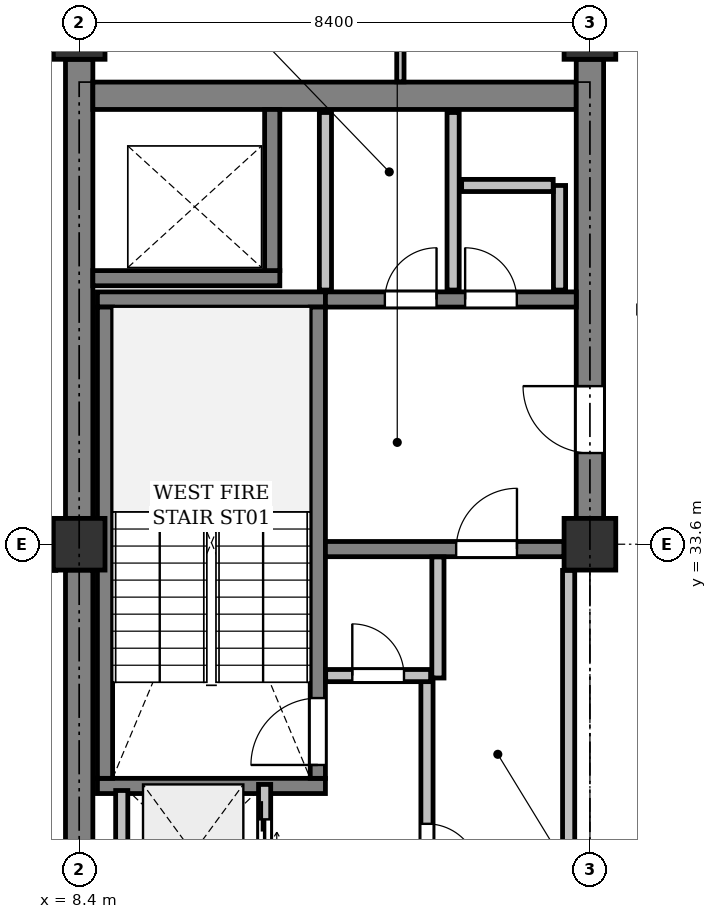
"""IFC4 building model, lengths in metres.
Left out: names, types, materials, properties, quantities, classifications, styles, units other than length and angle.
Written with IfcOpenShell. Run it as: python <this file> out.ifc"""

import sys

from ifc_helpers import new_model, si_unit, direction, frame, frame_2d, origin, origin_2d, place, context, subcontext, project, spatial, rectangle, extrude, element, fill, save


model = new_model("IFC4")
c1 = context("Model", 3, precision=1e-05, world=origin(), true_north=direction((0.0, 1.0)))
c2 = subcontext(c1, "Body", "Model", "MODEL_VIEW")
j1 = project(units=[si_unit("LENGTHUNIT", "METRE"), si_unit("PLANEANGLEUNIT", "RADIAN")], contexts=[c1])
p1 = place(None, origin())
s1 = spatial("IfcSite", under=j1, at=p1, CompositionType="ELEMENT")
p2 = place(p1, origin())
s2 = spatial("IfcBuilding", under=s1, at=p2, CompositionType="ELEMENT")
p3 = place(p2, frame((0.0, 0.0, 314.2)))
s3 = spatial("IfcBuildingStorey", under=s2, at=p3, CompositionType="ELEMENT", Elevation=314.2)
for number, where, z_axis, x_axis in (
    (1, (8.4, 33.6, 0.0), (0.0, 0.0, 1.0), (1.0, 0.0, 0.0)),
    (2, (8.4, 42.0, 0.0), (0.0, 0.0, 1.0), (1.0, 0.0, 0.0)),
    (3, (16.8, 33.6, 0.0), (0.0, 0.0, 1.0), (1.0, 0.0, 0.0)),
    (4, (16.8, 42.0, 0.0), (0.0, 0.0, 1.0), (1.0, 0.0, 0.0)),
):
    element("IfcColumn", number, at=place(p3, frame(where, z_axis=z_axis, x_axis=x_axis)), inside=s3, PredefinedType="COLUMN", context=c2, shape_type="SweptSolid", body=[
        extrude(rectangle(XDim=0.85, YDim=0.85, at=origin_2d()), origin(), (0.0, 0.0, 1.0), 4.0),
    ])
for number, where, z_axis, x_axis in (
    (5, (8.4, 25.625, 0.0), (0.0, 0.0, 1.0), (0.0, 1.0, 0.0)),
    (6, (8.4, 34.025, 0.0), (0.0, 0.0, 1.0), (0.0, 1.0, 0.0)),
):
    element("IfcWall", number, at=place(p3, frame(where, z_axis=z_axis, x_axis=x_axis)), inside=s3, PredefinedType="SHEAR", context=c2, shape_type="SweptSolid", body=[
        extrude(rectangle(XDim=7.55, YDim=0.45, at=frame_2d((3.775, 0.0))), origin(), (0.0, 0.0, 1.0), 3.725),
    ])
p4 = place(p3, frame((8.625, 40.975, 0.0), z_axis=(0.0, 0.0, 1.0), x_axis=(1.0, 0.0, 0.0)))
e7 = element("IfcWall", 7, at=p4, inside=s3, PredefinedType="SHEAR", context=c2, shape_type="SweptSolid", body=[
    extrude(rectangle(XDim=7.95, YDim=0.45, at=frame_2d((3.975, 0.0))), origin(), (0.0, 0.0, 1.0), 3.725),
])
p5 = place(p3, frame((16.8, 34.025, 0.0), z_axis=(0.0, 0.0, 1.0), x_axis=(0.0, 1.0, 0.0)))
e8 = element("IfcWall", 8, at=p5, inside=s3, PredefinedType="SHEAR", context=c2, shape_type="SweptSolid", body=[
    extrude(rectangle(XDim=7.55, YDim=0.45, at=frame_2d((3.775, 0.0))), origin(), (0.0, 0.0, 1.0), 3.725),
])
p6 = place(p5, frame((1.075, 0.0, 0.0)))
e9 = element("IfcOpeningElement", 9, at=p6, cuts=e8, PredefinedType="OPENING", context=c2, shape_type="SweptSolid", body=[
    extrude(rectangle(XDim=1.1, YDim=2.15, at=frame_2d((0.55, 1.075))), frame((0.0, 0.235, 0.0), z_axis=(0.0, -1.0, 0.0), x_axis=(1.0, 0.0, 0.0)), (0.0, 0.0, 1.0), 0.47),
])
for number, where, z_axis, x_axis in (
    (10, (12.45, 29.625, 0.0), (0.0, 0.0, 1.0), (-1.0, 0.0, 0.0)),
    (11, (12.45, 37.625, 0.0), (0.0, 0.0, 1.0), (-1.0, 0.0, 0.0)),
):
    element("IfcWall", number, at=place(p3, frame(where, z_axis=z_axis, x_axis=x_axis)), inside=s3, PredefinedType="SHEAR", context=c2, shape_type="SweptSolid", body=[
        extrude(rectangle(XDim=3.75, YDim=0.25, at=frame_2d((1.875, 0.0))), origin(), (0.0, 0.0, 1.0), 3.725),
    ])
p7 = place(p3, frame((12.325, 29.75, 0.0), z_axis=(0.0, 0.0, 1.0), x_axis=(0.0, 1.0, 0.0)))
e12 = element("IfcWall", 12, at=p7, inside=s3, PredefinedType="SHEAR", context=c2, shape_type="SweptSolid", body=[
    extrude(rectangle(XDim=7.75, YDim=0.25, at=frame_2d((3.875, 0.0))), origin(), (0.0, 0.0, 1.0), 3.725),
])
p8 = place(p7, frame((0.22, 0.0, 0.0)))
e13 = element("IfcOpeningElement", 13, at=p8, cuts=e12, PredefinedType="OPENING", context=c2, shape_type="SweptSolid", body=[
    extrude(rectangle(XDim=1.1, YDim=2.15, at=frame_2d((0.55, 1.075))), frame((0.0, 0.135, 0.0), z_axis=(0.0, -1.0, 0.0), x_axis=(1.0, 0.0, 0.0)), (0.0, 0.0, 1.0), 0.27),
])
p9 = place(p3, frame((8.825, 29.75, 0.0), z_axis=(0.0, 0.0, 1.0), x_axis=(0.0, 1.0, 0.0)))
e14 = element("IfcWall", 14, at=p9, inside=s3, PredefinedType="SHEAR", context=c2, shape_type="SweptSolid", body=[
    extrude(rectangle(XDim=7.75, YDim=0.25, at=frame_2d((3.875, 0.0))), origin(), (0.0, 0.0, 1.0), 3.725),
])
p10 = place(p3, frame((8.625, 37.975, 0.0), z_axis=(0.0, 0.0, 1.0), x_axis=(1.0, 0.0, 0.0)))
e15 = element("IfcWall", 15, at=p10, inside=s3, PredefinedType="SHEAR", context=c2, shape_type="SweptSolid", body=[
    extrude(rectangle(XDim=3.075, YDim=0.25, at=frame_2d((1.538, 0.0))), origin(), (0.0, 0.0, 1.0), 3.725),
])
p11 = place(p3, frame((11.575, 38.1, 0.0), z_axis=(0.0, 0.0, 1.0), x_axis=(0.0, 1.0, 0.0)))
e16 = element("IfcWall", 16, at=p11, inside=s3, PredefinedType="SHEAR", context=c2, shape_type="SweptSolid", body=[
    extrude(rectangle(XDim=2.65, YDim=0.25, at=frame_2d((1.325, 0.0))), origin(), (0.0, 0.0, 1.0), 3.725),
])
p12 = place(p3, frame((12.45, 33.52, 0.0), z_axis=(0.0, 0.0, 1.0), x_axis=(1.0, 0.0, 0.0)))
e17 = element("IfcWall", 17, at=p12, inside=s3, PredefinedType="SHEAR", context=c2, shape_type="SweptSolid", body=[
    extrude(rectangle(XDim=3.925, YDim=0.25, at=frame_2d((1.962, 0.0))), origin(), (0.0, 0.0, 1.0), 3.725),
])
p13 = place(p12, frame((2.15, 0.0, 0.0)))
e18 = element("IfcOpeningElement", 18, at=p13, cuts=e17, PredefinedType="OPENING", context=c2, shape_type="SweptSolid", body=[
    extrude(rectangle(XDim=1.0, YDim=2.15, at=frame_2d((0.5, 1.075))), frame((0.0, 0.135, 0.0), z_axis=(0.0, -1.0, 0.0), x_axis=(1.0, 0.0, 0.0)), (0.0, 0.0, 1.0), 0.27),
])
p14 = place(p3, frame((12.45, 37.625, 0.0), z_axis=(0.0, 0.0, 1.0), x_axis=(1.0, 0.0, 0.0)))
e19 = element("IfcWall", 19, at=p14, inside=s3, PredefinedType="SHEAR", context=c2, shape_type="SweptSolid", body=[
    extrude(rectangle(XDim=4.125, YDim=0.25, at=frame_2d((2.062, 0.0))), origin(), (0.0, 0.0, 1.0), 3.725),
])
p15 = place(p14, frame((0.978, 0.0, 0.0)))
e20 = element("IfcOpeningElement", 20, at=p15, cuts=e19, PredefinedType="OPENING", context=c2, shape_type="SweptSolid", body=[
    extrude(rectangle(XDim=0.85, YDim=2.15, at=frame_2d((0.425, 1.075))), frame((0.0, 0.135, 0.0), z_axis=(0.0, -1.0, 0.0), x_axis=(1.0, 0.0, 0.0)), (0.0, 0.0, 1.0), 0.27),
])
p16 = place(p14, frame((2.298, 0.0, 0.0)))
e21 = element("IfcOpeningElement", 21, at=p16, cuts=e19, PredefinedType="OPENING", context=c2, shape_type="SweptSolid", body=[
    extrude(rectangle(XDim=0.85, YDim=2.15, at=frame_2d((0.425, 1.075))), frame((0.0, 0.135, 0.0), z_axis=(0.0, -1.0, 0.0), x_axis=(1.0, 0.0, 0.0)), (0.0, 0.0, 1.0), 0.27),
])
p17 = place(p3, frame((11.45, 27.4, 0.0), z_axis=(0.0, 0.0, 1.0), x_axis=(0.0, 1.0, 0.0)))
e22 = element("IfcWall", 22, at=p17, inside=s3, PredefinedType="PARTITIONING", context=c2, shape_type="SweptSolid", body=[
    extrude(rectangle(XDim=2.25, YDim=0.2, at=frame_2d((1.125, 0.0))), origin(), (0.0, 0.0, 1.0), 3.725),
])
p18 = place(p17, frame((0.575, 0.0, 0.0)))
e23 = element("IfcOpeningElement", 23, at=p18, cuts=e22, PredefinedType="OPENING", context=c2, shape_type="SweptSolid", body=[
    extrude(rectangle(XDim=1.1, YDim=2.2, at=frame_2d((0.55, 1.1))), frame((0.0, 0.11, 0.0), z_axis=(0.0, -1.0, 0.0), x_axis=(1.0, 0.0, 0.0)), (0.0, 0.0, 1.0), 0.22),
])
p19 = place(p3, frame((9.1, 27.5, 0.0), z_axis=(0.0, 0.0, 1.0), x_axis=(0.0, 1.0, 0.0)))
e24 = element("IfcWall", 24, at=p19, inside=s3, PredefinedType="PARTITIONING", context=c2, shape_type="SweptSolid", body=[
    extrude(rectangle(XDim=2.05, YDim=0.2, at=frame_2d((1.025, 0.0))), origin(), (0.0, 0.0, 1.0), 3.725),
])
p20 = place(p3, frame((16.45, 25.754, 0.0), z_axis=(0.0, 0.0, 1.0), x_axis=(0.0, 1.0, 0.0)))
e25 = element("IfcWall", 25, at=p20, inside=s3, PredefinedType="PARTITIONING", context=c2, shape_type="SweptSolid", body=[
    extrude(rectangle(XDim=7.416, YDim=0.2, at=frame_2d((3.708, 0.0))), origin(), (0.0, 0.0, 1.0), 3.725),
])
p21 = place(p3, frame((14.3, 33.391, 0.0), z_axis=(0.0, 0.0, 1.0), x_axis=(0.0, -1.0, 0.0)))
e26 = element("IfcWall", 26, at=p21, inside=s3, PredefinedType="PARTITIONING", context=c2, shape_type="SweptSolid", body=[
    extrude(rectangle(XDim=1.991, YDim=0.2, at=frame_2d((0.996, 0.0))), origin(), (0.0, 0.0, 1.0), 3.725),
])
p22 = place(p3, frame((14.12, 31.4, 0.0), z_axis=(0.0, 0.0, 1.0), x_axis=(0.0, -1.0, 0.0)))
e27 = element("IfcWall", 27, at=p22, inside=s3, PredefinedType="PARTITIONING", context=c2, shape_type="SweptSolid", body=[
    extrude(rectangle(XDim=5.646, YDim=0.2, at=frame_2d((2.823, 0.0))), origin(), (0.0, 0.0, 1.0), 3.725),
])
p23 = place(p22, frame((2.398, 0.0, 0.0)))
e28 = element("IfcOpeningElement", 28, at=p23, cuts=e27, PredefinedType="OPENING", context=c2, shape_type="SweptSolid", body=[
    extrude(rectangle(XDim=0.85, YDim=2.15, at=frame_2d((0.425, 1.075))), frame((0.0, 0.11, 0.0), z_axis=(0.0, -1.0, 0.0), x_axis=(1.0, 0.0, 0.0)), (0.0, 0.0, 1.0), 0.22),
])
p24 = place(p3, frame((12.454, 31.44, 0.0), z_axis=(0.0, 0.0, 1.0), x_axis=(1.0, 0.0, 0.0)))
e29 = element("IfcWall", 29, at=p24, inside=s3, PredefinedType="PARTITIONING", context=c2, shape_type="SweptSolid", body=[
    extrude(rectangle(XDim=1.726, YDim=0.2, at=frame_2d((0.863, 0.0))), origin(), (0.0, 0.0, 1.0), 3.725),
])
p25 = place(p24, frame((0.438, 0.0, 0.0)))
e30 = element("IfcOpeningElement", 30, at=p25, cuts=e29, PredefinedType="OPENING", context=c2, shape_type="SweptSolid", body=[
    extrude(rectangle(XDim=0.85, YDim=2.15, at=frame_2d((0.425, 1.075))), frame((0.0, 0.11, 0.0), z_axis=(0.0, -1.0, 0.0), x_axis=(1.0, 0.0, 0.0)), (0.0, 0.0, 1.0), 0.22),
])
for number, where, z_axis, x_axis in (
    (31, (14.55, 37.78, 0.0), (0.0, 0.0, 1.0), (0.0, 1.0, 0.0)),
    (32, (12.45, 40.7, 0.0), (0.0, 0.0, 1.0), (0.0, -1.0, 0.0)),
):
    element("IfcWall", number, at=place(p3, frame(where, z_axis=z_axis, x_axis=x_axis)), inside=s3, PredefinedType="PARTITIONING", context=c2, shape_type="SweptSolid", body=[
        extrude(rectangle(XDim=2.92, YDim=0.2, at=frame_2d((1.46, 0.0))), origin(), (0.0, 0.0, 1.0), 2.775),
    ])
p26 = place(p3, frame((16.3, 37.78, 0.0), z_axis=(0.0, 0.0, 1.0), x_axis=(0.0, 1.0, 0.0)))
e33 = element("IfcWall", 33, at=p26, inside=s3, PredefinedType="PARTITIONING", context=c2, shape_type="SweptSolid", body=[
    extrude(rectangle(XDim=1.72, YDim=0.2, at=frame_2d((0.86, 0.0))), origin(), (0.0, 0.0, 1.0), 2.775),
])
p27 = place(p3, frame((16.196, 39.5, 0.0), z_axis=(0.0, 0.0, 1.0), x_axis=(-1.0, 0.0, 0.0)))
e34 = element("IfcWall", 34, at=p27, inside=s3, PredefinedType="PARTITIONING", context=c2, shape_type="SweptSolid", body=[
    extrude(rectangle(XDim=1.506, YDim=0.2, at=frame_2d((0.753, 0.0))), origin(), (0.0, 0.0, 1.0), 2.775),
])
p28 = place(p3, frame((13.683, 41.831, 0.0), z_axis=(0.0, 0.0, 1.0), x_axis=(0.0, -1.0, 0.0)))
e35 = element("IfcWall", 35, at=p28, inside=s3, PredefinedType="PARTITIONING", context=c2, shape_type="SweptSolid", body=[
    extrude(rectangle(XDim=0.627, YDim=0.12, at=frame_2d((0.313, 0.0))), origin(), (0.0, 0.0, 1.0), 3.725),
])
p29 = place(p3, frame((7.956, 33.169, 0.0), z_axis=(0.0, 0.0, 1.0), x_axis=(-0.000855919801, 0.999999633701, 0.0)))
e36 = element("IfcWall", 36, at=p29, inside=s3, PredefinedType="PARTITIONING", context=c2, shape_type="SweptSolid", body=[
    extrude(rectangle(XDim=0.856, YDim=0.12, at=frame_2d((0.428, 0.0))), origin(), (0.0, 0.0, 1.0), 3.271),
])
p30 = place(p6, origin())
e37 = element("IfcDoor", 37, at=p30, inside=s3, OperationType="SINGLE_SWING_LEFT", PredefinedType="DOOR", context=c2, shape_type="SweptSolid", body=[
    extrude(rectangle(XDim=1.1, YDim=2.15, at=frame_2d((0.55, 1.075))), frame((0.0, 0.025, 0.0), z_axis=(0.0, -1.0, 0.0), x_axis=(1.0, 0.0, 0.0)), (0.0, 0.0, 1.0), 0.05),
])
fill(e9, e37)
p31 = place(p8, origin())
e38 = element("IfcDoor", 38, at=p31, inside=s3, OperationType="SINGLE_SWING_RIGHT", PredefinedType="DOOR", context=c2, shape_type="SweptSolid", body=[
    extrude(rectangle(XDim=1.1, YDim=2.15, at=frame_2d((0.55, 1.075))), frame((0.0, 0.025, 0.0), z_axis=(0.0, -1.0, 0.0), x_axis=(1.0, 0.0, 0.0)), (0.0, 0.0, 1.0), 0.05),
])
fill(e13, e38)
p32 = place(p13, origin())
e39 = element("IfcDoor", 39, at=p32, inside=s3, OperationType="SINGLE_SWING_RIGHT", PredefinedType="DOOR", context=c2, shape_type="SweptSolid", body=[
    extrude(rectangle(XDim=1.0, YDim=2.15, at=frame_2d((0.5, 1.075))), frame((0.0, 0.025, 0.0), z_axis=(0.0, -1.0, 0.0), x_axis=(1.0, 0.0, 0.0)), (0.0, 0.0, 1.0), 0.05),
])
fill(e18, e39)
p33 = place(p18, origin())
e40 = element("IfcDoor", 40, at=p33, inside=s3, OperationType="DOUBLE_DOOR_SLIDING", PredefinedType="DOOR", context=c2, shape_type="SweptSolid", body=[
    extrude(rectangle(XDim=1.1, YDim=2.2, at=frame_2d((0.55, 1.1))), frame((0.0, 0.025, 0.0), z_axis=(0.0, -1.0, 0.0), x_axis=(1.0, 0.0, 0.0)), (0.0, 0.0, 1.0), 0.05),
])
fill(e23, e40)
p34 = place(p23, origin())
e41 = element("IfcDoor", 41, at=p34, inside=s3, OperationType="SINGLE_SWING_RIGHT", PredefinedType="DOOR", context=c2, shape_type="SweptSolid", body=[
    extrude(rectangle(XDim=0.85, YDim=2.15, at=frame_2d((0.425, 1.075))), frame((0.0, 0.025, 0.0), z_axis=(0.0, -1.0, 0.0), x_axis=(1.0, 0.0, 0.0)), (0.0, 0.0, 1.0), 0.05),
])
fill(e28, e41)
p35 = place(p25, origin())
e42 = element("IfcDoor", 42, at=p35, inside=s3, OperationType="SINGLE_SWING_LEFT", PredefinedType="DOOR", context=c2, shape_type="SweptSolid", body=[
    extrude(rectangle(XDim=0.85, YDim=2.15, at=frame_2d((0.425, 1.075))), frame((0.0, 0.025, 0.0), z_axis=(0.0, -1.0, 0.0), x_axis=(1.0, 0.0, 0.0)), (0.0, 0.0, 1.0), 0.05),
])
fill(e30, e42)
p36 = place(p15, origin())
e43 = element("IfcDoor", 43, at=p36, inside=s3, OperationType="SINGLE_SWING_RIGHT", PredefinedType="DOOR", context=c2, shape_type="SweptSolid", body=[
    extrude(rectangle(XDim=0.85, YDim=2.15, at=frame_2d((0.425, 1.075))), frame((0.0, 0.025, 0.0), z_axis=(0.0, -1.0, 0.0), x_axis=(1.0, 0.0, 0.0)), (0.0, 0.0, 1.0), 0.05),
])
fill(e20, e43)
p37 = place(p16, origin())
e44 = element("IfcDoor", 44, at=p37, inside=s3, OperationType="SINGLE_SWING_LEFT", PredefinedType="DOOR", context=c2, shape_type="SweptSolid", body=[
    extrude(rectangle(XDim=0.85, YDim=2.15, at=frame_2d((0.425, 1.075))), frame((0.0, 0.025, 0.0), z_axis=(0.0, -1.0, 0.0), x_axis=(1.0, 0.0, 0.0)), (0.0, 0.0, 1.0), 0.05),
])
fill(e21, e44)
save(model, sys.argv[1])
